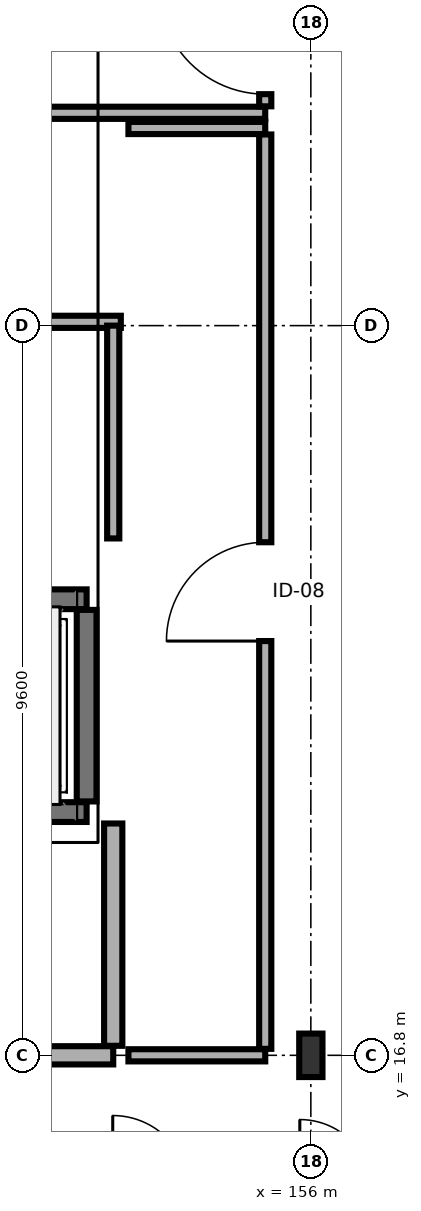
"""IFC4 building model, lengths in metres.
Left out: names, types, materials, properties, quantities, classifications, styles, units other than length and angle.
Written with IfcOpenShell. Run it as: python <this file> out.ifc"""

import sys

from ifc_helpers import new_model, si_unit, direction, frame, frame_2d, origin, origin_2d, place, context, subcontext, project, spatial, rectangle, i_section, extrude, element, fill, save


model = new_model("IFC4")
c1 = context("Model", 3, precision=1e-05, world=origin(), true_north=direction((0.0, 1.0)))
c2 = subcontext(c1, "Body", "Model", "MODEL_VIEW")
j1 = project(units=[si_unit("LENGTHUNIT", "METRE"), si_unit("PLANEANGLEUNIT", "RADIAN")], contexts=[c1])
p1 = place(None, origin())
s1 = spatial("IfcSite", under=j1, at=p1, CompositionType="ELEMENT")
p2 = place(p1, origin())
s2 = spatial("IfcBuilding", under=s1, at=p2, CompositionType="ELEMENT")
p3 = place(p2, frame((0.0, 0.0, 14.7)))
s3 = spatial("IfcBuildingStorey", under=s2, at=p3, CompositionType="ELEMENT", Elevation=14.7)
p4 = place(p3, frame((156.0, 16.8, 0.0), z_axis=(0.0, 0.0, 1.0), x_axis=(1.0, 0.0, 0.0)))
e1 = element("IfcColumn", 1, at=p4, inside=s3, PredefinedType="COLUMN", context=c2, shape_type="SweptSolid", body=[
    extrude(i_section(OverallWidth=0.306, OverallDepth=0.572, WebThickness=0.021, FlangeThickness=0.04, FilletRadius=0.027, at=origin_2d()), origin(), (0.0, 0.0, 1.0), 3.4),
])
p5 = place(p3, frame((150.55, 20.0, 0.0), z_axis=(0.0, 0.0, 1.0), x_axis=(1.0, 0.0, 0.0)))
e2 = element("IfcWall", 2, at=p5, inside=s3, PredefinedType="SHEAR", context=c2, shape_type="SweptSolid", body=[
    extrude(rectangle(XDim=2.5, YDim=0.26, at=frame_2d((1.25, 0.0))), origin(), (0.0, 0.0, 1.0), 3.215),
])
p6 = place(p5, frame((0.55, 0.0, 0.0)))
e3 = element("IfcOpeningElement", 3, at=p6, cuts=e2, PredefinedType="OPENING", context=c2, shape_type="SweptSolid", body=[
    extrude(rectangle(XDim=1.4, YDim=2.3, at=frame_2d((0.7, 1.15))), frame((0.0, 0.14, 0.0), z_axis=(0.0, -1.0, 0.0), x_axis=(1.0, 0.0, 0.0)), (0.0, 0.0, 1.0), 0.28),
])
p7 = place(p3, frame((150.55, 22.8, 0.0), z_axis=(0.0, 0.0, 1.0), x_axis=(1.0, 0.0, 0.0)))
e4 = element("IfcWall", 4, at=p7, inside=s3, PredefinedType="SHEAR", context=c2, shape_type="SweptSolid", body=[
    extrude(rectangle(XDim=2.5, YDim=0.26, at=frame_2d((1.25, 0.0))), origin(), (0.0, 0.0, 1.0), 3.215),
])
p8 = place(p3, frame((153.05, 20.14, 0.0), z_axis=(0.0, 0.0, 1.0), x_axis=(0.0, 1.0, 0.0)))
e5 = element("IfcWall", 5, at=p8, inside=s3, PredefinedType="SHEAR", context=c2, shape_type="SweptSolid", body=[
    extrude(rectangle(XDim=2.52, YDim=0.26, at=frame_2d((1.26, 0.0))), origin(), (0.0, 0.0, 1.0), 3.215),
])
p9 = place(p3, frame((146.4, 16.8, 0.0), z_axis=(0.0, 0.0, 1.0), x_axis=(1.0, 0.0, 0.0)))
e6 = element("IfcWall", 6, at=p9, inside=s3, PredefinedType="SOLIDWALL", context=c2, shape_type="SweptSolid", body=[
    extrude(rectangle(XDim=7.0, YDim=0.24, at=frame_2d((3.5, 0.0))), origin(), (0.0, 0.0, 1.0), 2.75),
])
p10 = place(p9, frame((2.7, 0.0, 0.0)))
e7 = element("IfcOpeningElement", 7, at=p10, cuts=e6, PredefinedType="OPENING", context=c2, shape_type="SweptSolid", body=[
    extrude(rectangle(XDim=1.6, YDim=2.2, at=frame_2d((0.8, 1.1))), frame((0.0, 0.13, 0.0), z_axis=(0.0, -1.0, 0.0), x_axis=(1.0, 0.0, 0.0)), (0.0, 0.0, 1.0), 0.26),
])
p11 = place(p3, frame((153.4, 16.925, 0.0), z_axis=(0.0, 0.0, 1.0), x_axis=(0.0, 1.0, 0.0)))
e8 = element("IfcWall", 8, at=p11, inside=s3, PredefinedType="SOLIDWALL", context=c2, shape_type="SweptSolid", body=[
    extrude(rectangle(XDim=2.925, YDim=0.24, at=frame_2d((1.462, 0.0))), origin(), (0.0, 0.0, 1.0), 2.75),
])
p12 = place(p3, frame((146.4, 29.2, 0.0), z_axis=(0.0, 0.0, 1.0), x_axis=(1.0, 0.0, 0.0)))
e9 = element("IfcWall", 9, at=p12, inside=s3, PredefinedType="PARTITIONING", context=c2, shape_type="SweptSolid", body=[
    extrude(rectangle(XDim=9.0, YDim=0.16, at=frame_2d((4.5, 0.0))), origin(), (0.0, 0.0, 1.0), 3.215),
])
p13 = place(p3, frame((155.4, 29.285, 0.0), z_axis=(0.0, 0.0, 1.0), x_axis=(0.0, 1.0, 0.0)))
e10 = element("IfcWall", 10, at=p13, inside=s3, PredefinedType="PARTITIONING", context=c2, shape_type="SweptSolid", body=[
    extrude(rectangle(XDim=9.03, YDim=0.16, at=frame_2d((4.515, 0.0))), origin(), (0.0, 0.0, 1.0), 3.215),
])
p14 = place(p13, frame((0.16, 0.0, 0.0)))
e11 = element("IfcOpeningElement", 11, at=p14, cuts=e10, PredefinedType="OPENING", context=c2, shape_type="SweptSolid", body=[
    extrude(rectangle(XDim=1.4, YDim=2.2, at=frame_2d((0.7, 1.1))), frame((0.0, 0.09, 0.0), z_axis=(0.0, -1.0, 0.0), x_axis=(1.0, 0.0, 0.0)), (0.0, 0.0, 1.0), 0.18),
])
p15 = place(p3, frame((153.6, 16.8, 0.0), z_axis=(0.0, 0.0, 1.0), x_axis=(1.0, 0.0, 0.0)))
e12 = element("IfcWall", 12, at=p15, inside=s3, PredefinedType="PARTITIONING", context=c2, shape_type="SweptSolid", body=[
    extrude(rectangle(XDim=1.8, YDim=0.16, at=frame_2d((0.9, 0.0))), origin(), (0.0, 0.0, 1.0), 2.75),
])
p16 = place(p3, frame((153.6, 29.0, 0.0), z_axis=(0.0, 0.0, 1.0), x_axis=(1.0, 0.0, 0.0)))
e13 = element("IfcWall", 13, at=p16, inside=s3, PredefinedType="PARTITIONING", context=c2, shape_type="SweptSolid", body=[
    extrude(rectangle(XDim=1.8, YDim=0.16, at=frame_2d((0.9, 0.0))), origin(), (0.0, 0.0, 1.0), 3.215),
])
p17 = place(p3, frame((155.4, 16.885, 0.0), z_axis=(0.0, 0.0, 1.0), x_axis=(0.0, 1.0, 0.0)))
e14 = element("IfcWall", 14, at=p17, inside=s3, PredefinedType="PARTITIONING", context=c2, shape_type="SweptSolid", body=[
    extrude(rectangle(XDim=12.03, YDim=0.16, at=frame_2d((6.015, 0.0))), origin(), (0.0, 0.0, 1.0), 2.75),
])
p18 = place(p17, frame((5.365, 0.0, 0.0)))
e15 = element("IfcOpeningElement", 15, at=p18, cuts=e14, PredefinedType="OPENING", context=c2, shape_type="SweptSolid", body=[
    extrude(rectangle(XDim=1.3, YDim=2.2, at=frame_2d((0.65, 1.1))), frame((0.0, 0.09, 0.0), z_axis=(0.0, -1.0, 0.0), x_axis=(1.0, 0.0, 0.0)), (0.0, 0.0, 1.0), 0.18),
])
p19 = place(p3, frame((152.35, 26.45, 0.0), z_axis=(0.0, 0.0, 1.0), x_axis=(1.0, 0.0, 0.0)))
e16 = element("IfcWall", 16, at=p19, inside=s3, PredefinedType="PARTITIONING", context=c2, shape_type="SweptSolid", body=[
    extrude(rectangle(XDim=1.15, YDim=0.16, at=frame_2d((0.575, 0.0))), origin(), (0.0, 0.0, 1.0), 3.215),
])
p20 = place(p3, frame((153.4, 23.6, 0.0), z_axis=(0.0, 0.0, 1.0), x_axis=(0.0, 1.0, 0.0)))
e17 = element("IfcWall", 17, at=p20, inside=s3, PredefinedType="PARTITIONING", context=c2, shape_type="SweptSolid", body=[
    extrude(rectangle(XDim=2.8, YDim=0.16, at=frame_2d((1.4, 0.0))), origin(), (0.0, 0.0, 1.0), 3.215),
])
p21 = place(p14, origin())
e18 = element("IfcDoor", 18, at=p21, inside=s3, OperationType="SINGLE_SWING_RIGHT", PredefinedType="DOOR", context=c2, shape_type="SweptSolid", body=[
    extrude(rectangle(XDim=1.4, YDim=2.2, at=frame_2d((0.7, 1.1))), frame((0.0, 0.025, 0.0), z_axis=(0.0, -1.0, 0.0), x_axis=(1.0, 0.0, 0.0)), (0.0, 0.0, 1.0), 0.05),
])
fill(e11, e18)
p22 = place(p18, origin())
e19 = element("IfcDoor", 19, at=p22, inside=s3, OperationType="SINGLE_SWING_LEFT", PredefinedType="DOOR", context=c2, shape_type="SweptSolid", body=[
    extrude(rectangle(XDim=1.3, YDim=2.2, at=frame_2d((0.65, 1.1))), frame((0.0, 0.025, 0.0), z_axis=(0.0, -1.0, 0.0), x_axis=(1.0, 0.0, 0.0)), (0.0, 0.0, 1.0), 0.05),
])
fill(e15, e19)
save(model, sys.argv[1])
